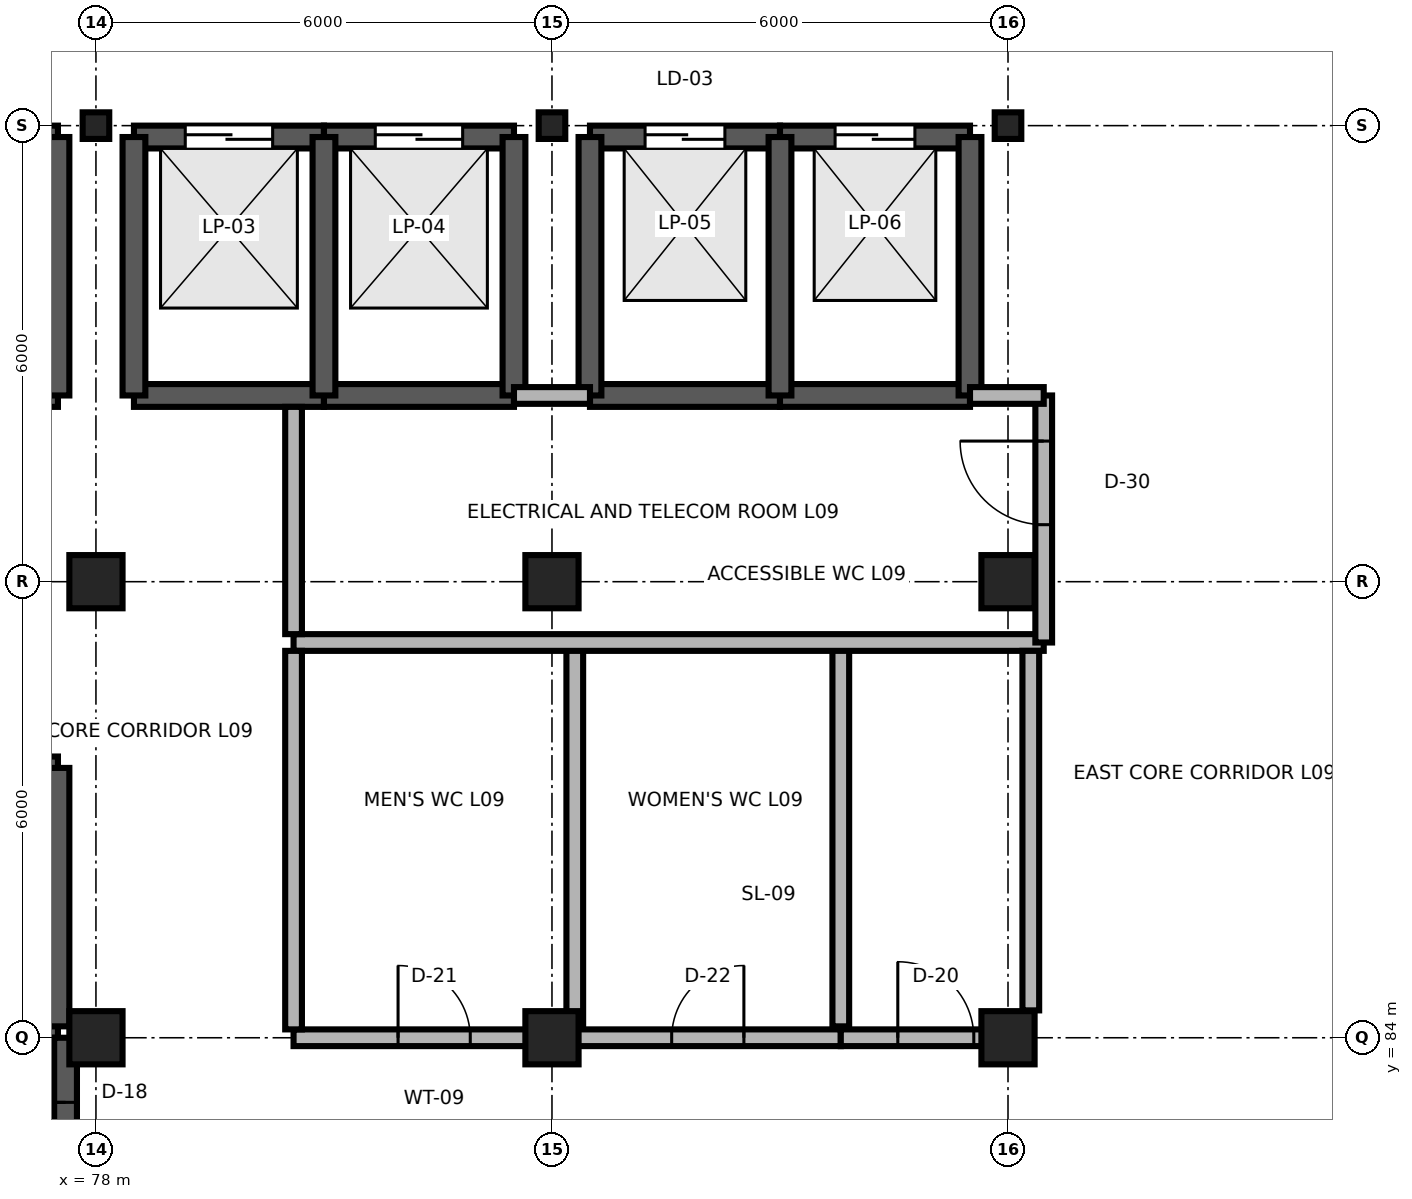
"""IFC4 building model, lengths in metres.
Left out: names, types, materials, properties, quantities, classifications, styles, units other than length and angle.
Written with IfcOpenShell. Run it as: python <this file> out.ifc"""

import sys

from ifc_helpers import new_model, si_unit, direction, frame, frame_2d, origin, origin_2d, place, context, subcontext, project, spatial, rectangle, i_section, extrude, element, fill, save


model = new_model("IFC4")
c1 = context("Model", 3, precision=1e-05, world=origin(), true_north=direction((0.0, 1.0)))
c2 = subcontext(c1, "Body", "Model", "MODEL_VIEW")
j1 = project(units=[si_unit("LENGTHUNIT", "METRE"), si_unit("PLANEANGLEUNIT", "RADIAN")], contexts=[c1])
p1 = place(None, origin())
s1 = spatial("IfcSite", under=j1, at=p1, CompositionType="ELEMENT")
p2 = place(p1, origin())
s2 = spatial("IfcBuilding", under=s1, at=p2, CompositionType="ELEMENT")
p3 = place(p2, frame((0.0, 0.0, 36.6)))
s3 = spatial("IfcBuildingStorey", under=s2, at=p3, CompositionType="ELEMENT", Elevation=36.6)
for number, where, z_axis, x_axis in (
    (1, (78.0, 84.0, 0.0), (0.0, 0.0, 1.0), (1.0, 0.0, 0.0)),
    (2, (84.0, 84.0, 0.0), (0.0, 0.0, 1.0), (1.0, 0.0, 0.0)),
    (3, (90.0, 84.0, 0.0), (0.0, 0.0, 1.0), (1.0, 0.0, 0.0)),
    (4, (78.0, 90.0, 0.0), (0.0, 0.0, 1.0), (1.0, 0.0, 0.0)),
    (5, (84.0, 90.0, 0.0), (0.0, 0.0, 1.0), (1.0, 0.0, 0.0)),
    (6, (90.0, 90.0, 0.0), (0.0, 0.0, 1.0), (1.0, 0.0, 0.0)),
):
    element("IfcColumn", number, at=place(p3, frame(where, z_axis=z_axis, x_axis=x_axis)), inside=s3, PredefinedType="COLUMN", context=c2, shape_type="SweptSolid", body=[
        extrude(rectangle(XDim=0.7, YDim=0.7, at=origin_2d()), origin(), (0.0, 0.0, 1.0), 3.9),
    ])
for number, where, z_axis, x_axis in (
    (7, (78.0, 96.0, 0.0), (0.0, 0.0, 1.0), (1.0, 0.0, 0.0)),
    (8, (84.0, 96.0, 0.0), (0.0, 0.0, 1.0), (1.0, 0.0, 0.0)),
    (9, (90.0, 96.0, 0.0), (0.0, 0.0, 1.0), (1.0, 0.0, 0.0)),
):
    element("IfcColumn", number, at=place(p3, frame(where, z_axis=z_axis, x_axis=x_axis)), inside=s3, PredefinedType="COLUMN", context=c2, shape_type="SweptSolid", body=[
        extrude(i_section(OverallWidth=0.35, OverallDepth=0.35, WebThickness=0.012, FlangeThickness=0.019, FilletRadius=0.02, at=origin_2d()), origin(), (0.0, 0.0, 1.0), 3.9),
    ])
p4 = place(p3, frame((75.0, 84.15, 0.0), z_axis=(0.0, 0.0, 1.0), x_axis=(1.0, 0.0, 0.0)))
e10 = element("IfcWall", 10, at=p4, inside=s3, PredefinedType="SHEAR", context=c2, shape_type="SweptSolid", body=[
    extrude(rectangle(XDim=2.5, YDim=0.3, at=frame_2d((1.25, 0.0))), origin(), (0.0, 0.0, 1.0), 3.74),
])
p5 = place(p4, frame((0.7, 0.0, 0.0)))
e11 = element("IfcOpeningElement", 11, at=p5, cuts=e10, PredefinedType="OPENING", context=c2, shape_type="SweptSolid", body=[
    extrude(rectangle(XDim=1.1, YDim=2.1, at=frame_2d((0.55, 1.05))), frame((0.0, 0.165, 0.0), z_axis=(0.0, -1.0, 0.0), x_axis=(1.0, 0.0, 0.0)), (0.0, 0.0, 1.0), 0.33),
])
p6 = place(p3, frame((75.0, 87.55, 0.0), z_axis=(0.0, 0.0, 1.0), x_axis=(1.0, 0.0, 0.0)))
e12 = element("IfcWall", 12, at=p6, inside=s3, PredefinedType="SHEAR", context=c2, shape_type="SweptSolid", body=[
    extrude(rectangle(XDim=2.5, YDim=0.3, at=frame_2d((1.25, 0.0))), origin(), (0.0, 0.0, 1.0), 3.74),
])
p7 = place(p3, frame((77.5, 84.15, 0.0), z_axis=(0.0, 0.0, 1.0), x_axis=(0.0, 1.0, 0.0)))
e13 = element("IfcWall", 13, at=p7, inside=s3, PredefinedType="SHEAR", context=c2, shape_type="SweptSolid", body=[
    extrude(rectangle(XDim=3.4, YDim=0.3, at=frame_2d((1.7, 0.0))), origin(), (0.0, 0.0, 1.0), 3.74),
])
p8 = place(p3, frame((75.0, 95.85, 0.0), z_axis=(0.0, 0.0, 1.0), x_axis=(1.0, 0.0, 0.0)))
e14 = element("IfcWall", 14, at=p8, inside=s3, PredefinedType="SHEAR", context=c2, shape_type="SweptSolid", body=[
    extrude(rectangle(XDim=2.5, YDim=0.3, at=frame_2d((1.25, 0.0))), origin(), (0.0, 0.0, 1.0), 3.74),
])
p9 = place(p8, frame((0.675, 0.0, 0.0)))
e15 = element("IfcOpeningElement", 15, at=p9, cuts=e14, PredefinedType="OPENING", context=c2, shape_type="SweptSolid", body=[
    extrude(rectangle(XDim=1.15, YDim=2.15, at=frame_2d((0.575, 1.075))), frame((0.0, 0.165, 0.0), z_axis=(0.0, -1.0, 0.0), x_axis=(1.0, 0.0, 0.0)), (0.0, 0.0, 1.0), 0.33),
])
p10 = place(p3, frame((75.0, 92.45, 0.0), z_axis=(0.0, 0.0, 1.0), x_axis=(1.0, 0.0, 0.0)))
e16 = element("IfcWall", 16, at=p10, inside=s3, PredefinedType="SHEAR", context=c2, shape_type="SweptSolid", body=[
    extrude(rectangle(XDim=2.5, YDim=0.3, at=frame_2d((1.25, 0.0))), origin(), (0.0, 0.0, 1.0), 3.74),
])
p11 = place(p3, frame((77.5, 92.45, 0.0), z_axis=(0.0, 0.0, 1.0), x_axis=(0.0, 1.0, 0.0)))
e17 = element("IfcWall", 17, at=p11, inside=s3, PredefinedType="SHEAR", context=c2, shape_type="SweptSolid", body=[
    extrude(rectangle(XDim=3.4, YDim=0.3, at=frame_2d((1.7, 0.0))), origin(), (0.0, 0.0, 1.0), 3.74),
])
p12 = place(p3, frame((78.5, 95.85, 0.0), z_axis=(0.0, 0.0, 1.0), x_axis=(1.0, 0.0, 0.0)))
e18 = element("IfcWall", 18, at=p12, inside=s3, PredefinedType="SHEAR", context=c2, shape_type="SweptSolid", body=[
    extrude(rectangle(XDim=2.5, YDim=0.3, at=frame_2d((1.25, 0.0))), origin(), (0.0, 0.0, 1.0), 3.74),
])
p13 = place(p12, frame((0.675, 0.0, 0.0)))
e19 = element("IfcOpeningElement", 19, at=p13, cuts=e18, PredefinedType="OPENING", context=c2, shape_type="SweptSolid", body=[
    extrude(rectangle(XDim=1.15, YDim=2.15, at=frame_2d((0.575, 1.075))), frame((0.0, 0.165, 0.0), z_axis=(0.0, -1.0, 0.0), x_axis=(1.0, 0.0, 0.0)), (0.0, 0.0, 1.0), 0.33),
])
p14 = place(p3, frame((78.5, 92.45, 0.0), z_axis=(0.0, 0.0, 1.0), x_axis=(1.0, 0.0, 0.0)))
e20 = element("IfcWall", 20, at=p14, inside=s3, PredefinedType="SHEAR", context=c2, shape_type="SweptSolid", body=[
    extrude(rectangle(XDim=2.5, YDim=0.3, at=frame_2d((1.25, 0.0))), origin(), (0.0, 0.0, 1.0), 3.74),
])
p15 = place(p3, frame((78.5, 92.45, 0.0), z_axis=(0.0, 0.0, 1.0), x_axis=(0.0, 1.0, 0.0)))
e21 = element("IfcWall", 21, at=p15, inside=s3, PredefinedType="SHEAR", context=c2, shape_type="SweptSolid", body=[
    extrude(rectangle(XDim=3.4, YDim=0.3, at=frame_2d((1.7, 0.0))), origin(), (0.0, 0.0, 1.0), 3.74),
])
p16 = place(p3, frame((81.0, 95.85, 0.0), z_axis=(0.0, 0.0, 1.0), x_axis=(1.0, 0.0, 0.0)))
e22 = element("IfcWall", 22, at=p16, inside=s3, PredefinedType="SHEAR", context=c2, shape_type="SweptSolid", body=[
    extrude(rectangle(XDim=2.5, YDim=0.3, at=frame_2d((1.25, 0.0))), origin(), (0.0, 0.0, 1.0), 3.74),
])
p17 = place(p16, frame((0.675, 0.0, 0.0)))
e23 = element("IfcOpeningElement", 23, at=p17, cuts=e22, PredefinedType="OPENING", context=c2, shape_type="SweptSolid", body=[
    extrude(rectangle(XDim=1.15, YDim=2.15, at=frame_2d((0.575, 1.075))), frame((0.0, 0.165, 0.0), z_axis=(0.0, -1.0, 0.0), x_axis=(1.0, 0.0, 0.0)), (0.0, 0.0, 1.0), 0.33),
])
p18 = place(p3, frame((81.0, 92.45, 0.0), z_axis=(0.0, 0.0, 1.0), x_axis=(1.0, 0.0, 0.0)))
e24 = element("IfcWall", 24, at=p18, inside=s3, PredefinedType="SHEAR", context=c2, shape_type="SweptSolid", body=[
    extrude(rectangle(XDim=2.5, YDim=0.3, at=frame_2d((1.25, 0.0))), origin(), (0.0, 0.0, 1.0), 3.74),
])
for number, where, z_axis, x_axis in (
    (25, (81.0, 92.45, 0.0), (0.0, 0.0, 1.0), (0.0, 1.0, 0.0)),
    (26, (83.5, 92.45, 0.0), (0.0, 0.0, 1.0), (0.0, 1.0, 0.0)),
):
    element("IfcWall", number, at=place(p3, frame(where, z_axis=z_axis, x_axis=x_axis)), inside=s3, PredefinedType="SHEAR", context=c2, shape_type="SweptSolid", body=[
        extrude(rectangle(XDim=3.4, YDim=0.3, at=frame_2d((1.7, 0.0))), origin(), (0.0, 0.0, 1.0), 3.74),
    ])
p19 = place(p3, frame((84.5, 95.85, 0.0), z_axis=(0.0, 0.0, 1.0), x_axis=(1.0, 0.0, 0.0)))
e27 = element("IfcWall", 27, at=p19, inside=s3, PredefinedType="SHEAR", context=c2, shape_type="SweptSolid", body=[
    extrude(rectangle(XDim=2.5, YDim=0.3, at=frame_2d((1.25, 0.0))), origin(), (0.0, 0.0, 1.0), 3.74),
])
p20 = place(p19, frame((0.725, 0.0, 0.0)))
e28 = element("IfcOpeningElement", 28, at=p20, cuts=e27, PredefinedType="OPENING", context=c2, shape_type="SweptSolid", body=[
    extrude(rectangle(XDim=1.05, YDim=2.1, at=frame_2d((0.525, 1.05))), frame((0.0, 0.165, 0.0), z_axis=(0.0, -1.0, 0.0), x_axis=(1.0, 0.0, 0.0)), (0.0, 0.0, 1.0), 0.33),
])
p21 = place(p3, frame((84.5, 92.45, 0.0), z_axis=(0.0, 0.0, 1.0), x_axis=(1.0, 0.0, 0.0)))
e29 = element("IfcWall", 29, at=p21, inside=s3, PredefinedType="SHEAR", context=c2, shape_type="SweptSolid", body=[
    extrude(rectangle(XDim=2.5, YDim=0.3, at=frame_2d((1.25, 0.0))), origin(), (0.0, 0.0, 1.0), 3.74),
])
p22 = place(p3, frame((84.5, 92.45, 0.0), z_axis=(0.0, 0.0, 1.0), x_axis=(0.0, 1.0, 0.0)))
e30 = element("IfcWall", 30, at=p22, inside=s3, PredefinedType="SHEAR", context=c2, shape_type="SweptSolid", body=[
    extrude(rectangle(XDim=3.4, YDim=0.3, at=frame_2d((1.7, 0.0))), origin(), (0.0, 0.0, 1.0), 3.74),
])
p23 = place(p3, frame((87.0, 95.85, 0.0), z_axis=(0.0, 0.0, 1.0), x_axis=(1.0, 0.0, 0.0)))
e31 = element("IfcWall", 31, at=p23, inside=s3, PredefinedType="SHEAR", context=c2, shape_type="SweptSolid", body=[
    extrude(rectangle(XDim=2.5, YDim=0.3, at=frame_2d((1.25, 0.0))), origin(), (0.0, 0.0, 1.0), 3.74),
])
p24 = place(p23, frame((0.725, 0.0, 0.0)))
e32 = element("IfcOpeningElement", 32, at=p24, cuts=e31, PredefinedType="OPENING", context=c2, shape_type="SweptSolid", body=[
    extrude(rectangle(XDim=1.05, YDim=2.1, at=frame_2d((0.525, 1.05))), frame((0.0, 0.165, 0.0), z_axis=(0.0, -1.0, 0.0), x_axis=(1.0, 0.0, 0.0)), (0.0, 0.0, 1.0), 0.33),
])
p25 = place(p3, frame((87.0, 92.45, 0.0), z_axis=(0.0, 0.0, 1.0), x_axis=(1.0, 0.0, 0.0)))
e33 = element("IfcWall", 33, at=p25, inside=s3, PredefinedType="SHEAR", context=c2, shape_type="SweptSolid", body=[
    extrude(rectangle(XDim=2.5, YDim=0.3, at=frame_2d((1.25, 0.0))), origin(), (0.0, 0.0, 1.0), 3.74),
])
for number, where, z_axis, x_axis in (
    (34, (87.0, 92.45, 0.0), (0.0, 0.0, 1.0), (0.0, 1.0, 0.0)),
    (35, (89.5, 92.45, 0.0), (0.0, 0.0, 1.0), (0.0, 1.0, 0.0)),
):
    element("IfcWall", number, at=place(p3, frame(where, z_axis=z_axis, x_axis=x_axis)), inside=s3, PredefinedType="SHEAR", context=c2, shape_type="SweptSolid", body=[
        extrude(rectangle(XDim=3.4, YDim=0.3, at=frame_2d((1.7, 0.0))), origin(), (0.0, 0.0, 1.0), 3.74),
    ])
p26 = place(p3, frame((77.6, 81.0, 0.0), z_axis=(0.0, 0.0, 1.0), x_axis=(0.0, 1.0, 0.0)))
e36 = element("IfcWall", 36, at=p26, inside=s3, PredefinedType="SHEAR", context=c2, shape_type="SweptSolid", body=[
    extrude(rectangle(XDim=3.0, YDim=0.3, at=frame_2d((1.5, 0.0))), origin(), (0.0, 0.0, 1.0), 3.74),
])
p27 = place(p26, frame((0.85, 0.0, 0.0)))
e37 = element("IfcOpeningElement", 37, at=p27, cuts=e36, PredefinedType="OPENING", context=c2, shape_type="SweptSolid", body=[
    extrude(rectangle(XDim=1.3, YDim=2.2, at=frame_2d((0.65, 1.1))), frame((0.0, 0.165, 0.0), z_axis=(0.0, -1.0, 0.0), x_axis=(1.0, 0.0, 0.0)), (0.0, 0.0, 1.0), 0.33),
])
p28 = place(p3, frame((80.6, 84.0, 0.0), z_axis=(0.0, 0.0, 1.0), x_axis=(1.0, 0.0, 0.0)))
e38 = element("IfcWall", 38, at=p28, inside=s3, PredefinedType="PARTITIONING", context=c2, shape_type="SweptSolid", body=[
    extrude(rectangle(XDim=3.7, YDim=0.22, at=frame_2d((1.85, 0.0))), origin(), (0.0, 0.0, 1.0), 3.348),
])
p29 = place(p28, frame((1.375, 0.0, 0.0)))
e39 = element("IfcOpeningElement", 39, at=p29, cuts=e38, PredefinedType="OPENING", context=c2, shape_type="SweptSolid", body=[
    extrude(rectangle(XDim=0.95, YDim=2.15, at=frame_2d((0.475, 1.075))), frame((0.0, 0.125, 0.0), z_axis=(0.0, -1.0, 0.0), x_axis=(1.0, 0.0, 0.0)), (0.0, 0.0, 1.0), 0.25),
])
p30 = place(p3, frame((84.3, 84.0, 0.0), z_axis=(0.0, 0.0, 1.0), x_axis=(1.0, 0.0, 0.0)))
e40 = element("IfcWall", 40, at=p30, inside=s3, PredefinedType="PARTITIONING", context=c2, shape_type="SweptSolid", body=[
    extrude(rectangle(XDim=3.5, YDim=0.22, at=frame_2d((1.75, 0.0))), origin(), (0.0, 0.0, 1.0), 3.348),
])
p31 = place(p30, frame((1.275, 0.0, 0.0)))
e41 = element("IfcOpeningElement", 41, at=p31, cuts=e40, PredefinedType="OPENING", context=c2, shape_type="SweptSolid", body=[
    extrude(rectangle(XDim=0.95, YDim=2.1, at=frame_2d((0.475, 1.05))), frame((0.0, 0.125, 0.0), z_axis=(0.0, -1.0, 0.0), x_axis=(1.0, 0.0, 0.0)), (0.0, 0.0, 1.0), 0.25),
])
p32 = place(p3, frame((87.8, 84.0, 0.0), z_axis=(0.0, 0.0, 1.0), x_axis=(1.0, 0.0, 0.0)))
e42 = element("IfcWall", 42, at=p32, inside=s3, PredefinedType="PARTITIONING", context=c2, shape_type="SweptSolid", body=[
    extrude(rectangle(XDim=2.5, YDim=0.22, at=frame_2d((1.25, 0.0))), origin(), (0.0, 0.0, 1.0), 3.348),
])
p33 = place(p32, frame((0.75, 0.0, 0.0)))
e43 = element("IfcOpeningElement", 43, at=p33, cuts=e42, PredefinedType="OPENING", context=c2, shape_type="SweptSolid", body=[
    extrude(rectangle(XDim=1.0, YDim=2.15, at=frame_2d((0.5, 1.075))), frame((0.0, 0.125, 0.0), z_axis=(0.0, -1.0, 0.0), x_axis=(1.0, 0.0, 0.0)), (0.0, 0.0, 1.0), 0.25),
])
for number, where, z_axis, x_axis in (
    (44, (84.3, 84.15, 0.0), (0.0, 0.0, 1.0), (0.0, 1.0, 0.0)),
    (45, (87.8, 84.15, 0.0), (0.0, 0.0, 1.0), (0.0, 1.0, 0.0)),
):
    element("IfcWall", number, at=place(p3, frame(where, z_axis=z_axis, x_axis=x_axis)), inside=s3, PredefinedType="PARTITIONING", context=c2, shape_type="SweptSolid", body=[
        extrude(rectangle(XDim=5.0, YDim=0.22, at=frame_2d((2.5, 0.0))), origin(), (0.0, 0.0, 1.0), 3.74),
    ])
p34 = place(p3, frame((80.6, 89.2, 0.0), z_axis=(0.0, 0.0, 1.0), x_axis=(1.0, 0.0, 0.0)))
e46 = element("IfcWall", 46, at=p34, inside=s3, PredefinedType="PARTITIONING", context=c2, shape_type="SweptSolid", body=[
    extrude(rectangle(XDim=9.87, YDim=0.22, at=frame_2d((4.935, 0.0))), origin(), (0.0, 0.0, 1.0), 3.74),
])
p35 = place(p3, frame((90.47, 89.2, 0.0), z_axis=(0.0, 0.0, 1.0), x_axis=(0.0, 1.0, 0.0)))
e47 = element("IfcWall", 47, at=p35, inside=s3, PredefinedType="PARTITIONING", context=c2, shape_type="SweptSolid", body=[
    extrude(rectangle(XDim=3.25, YDim=0.22, at=frame_2d((1.625, 0.0))), origin(), (0.0, 0.0, 1.0), 3.74),
])
p36 = place(p35, frame((1.55, 0.0, 0.0)))
e48 = element("IfcOpeningElement", 48, at=p36, cuts=e47, PredefinedType="OPENING", context=c2, shape_type="SweptSolid", body=[
    extrude(rectangle(XDim=1.1, YDim=2.15, at=frame_2d((0.55, 1.075))), frame((0.0, 0.125, 0.0), z_axis=(0.0, -1.0, 0.0), x_axis=(1.0, 0.0, 0.0)), (0.0, 0.0, 1.0), 0.25),
])
p37 = place(p3, frame((80.6, 84.11, 0.0), z_axis=(0.0, 0.0, 1.0), x_axis=(0.0, 1.0, 0.0)))
e49 = element("IfcWall", 49, at=p37, inside=s3, PredefinedType="PARTITIONING", context=c2, shape_type="SweptSolid", body=[
    extrude(rectangle(XDim=4.98, YDim=0.22, at=frame_2d((2.49, 0.0))), origin(), (0.0, 0.0, 1.0), 3.74),
])
p38 = place(p3, frame((90.3, 84.36, 0.0), z_axis=(0.0, 0.0, 1.0), x_axis=(0.0, 1.0, 0.0)))
e50 = element("IfcWall", 50, at=p38, inside=s3, PredefinedType="PARTITIONING", context=c2, shape_type="SweptSolid", body=[
    extrude(rectangle(XDim=4.73, YDim=0.22, at=frame_2d((2.365, 0.0))), origin(), (0.0, 0.0, 1.0), 3.74),
])
p39 = place(p3, frame((80.6, 89.31, 0.0), z_axis=(0.0, 0.0, 1.0), x_axis=(0.0, 1.0, 0.0)))
e51 = element("IfcWall", 51, at=p39, inside=s3, PredefinedType="PARTITIONING", context=c2, shape_type="SweptSolid", body=[
    extrude(rectangle(XDim=2.99, YDim=0.22, at=frame_2d((1.495, 0.0))), origin(), (0.0, 0.0, 1.0), 3.74),
])
p40 = place(p3, frame((83.5, 92.45, 0.0), z_axis=(0.0, 0.0, 1.0), x_axis=(1.0, 0.0, 0.0)))
e52 = element("IfcWall", 52, at=p40, inside=s3, PredefinedType="PARTITIONING", context=c2, shape_type="SweptSolid", body=[
    extrude(rectangle(XDim=1.0, YDim=0.22, at=frame_2d((0.5, 0.0))), origin(), (0.0, 0.0, 1.0), 3.74),
])
p41 = place(p3, frame((89.5, 92.45, 0.0), z_axis=(0.0, 0.0, 1.0), x_axis=(1.0, 0.0, 0.0)))
e53 = element("IfcWall", 53, at=p41, inside=s3, PredefinedType="PARTITIONING", context=c2, shape_type="SweptSolid", body=[
    extrude(rectangle(XDim=0.97, YDim=0.22, at=frame_2d((0.485, 0.0))), origin(), (0.0, 0.0, 1.0), 3.74),
])
p42 = place(p13, origin())
e54 = element("IfcDoor", 54, at=p42, inside=s3, OperationType="DOUBLE_DOOR_SLIDING", PredefinedType="DOOR", context=c2, shape_type="SweptSolid", body=[
    extrude(rectangle(XDim=1.15, YDim=2.15, at=frame_2d((0.575, 1.075))), frame((0.0, 0.025, 0.0), z_axis=(0.0, -1.0, 0.0), x_axis=(1.0, 0.0, 0.0)), (0.0, 0.0, 1.0), 0.05),
])
fill(e19, e54)
p43 = place(p17, origin())
e55 = element("IfcDoor", 55, at=p43, inside=s3, OperationType="DOUBLE_DOOR_SLIDING", PredefinedType="DOOR", context=c2, shape_type="SweptSolid", body=[
    extrude(rectangle(XDim=1.15, YDim=2.15, at=frame_2d((0.575, 1.075))), frame((0.0, 0.025, 0.0), z_axis=(0.0, -1.0, 0.0), x_axis=(1.0, 0.0, 0.0)), (0.0, 0.0, 1.0), 0.05),
])
fill(e23, e55)
p44 = place(p20, origin())
e56 = element("IfcDoor", 56, at=p44, inside=s3, OperationType="DOUBLE_DOOR_SLIDING", PredefinedType="DOOR", context=c2, shape_type="SweptSolid", body=[
    extrude(rectangle(XDim=1.05, YDim=2.1, at=frame_2d((0.525, 1.05))), frame((0.0, 0.025, 0.0), z_axis=(0.0, -1.0, 0.0), x_axis=(1.0, 0.0, 0.0)), (0.0, 0.0, 1.0), 0.05),
])
fill(e28, e56)
p45 = place(p24, origin())
e57 = element("IfcDoor", 57, at=p45, inside=s3, OperationType="DOUBLE_DOOR_SLIDING", PredefinedType="DOOR", context=c2, shape_type="SweptSolid", body=[
    extrude(rectangle(XDim=1.05, YDim=2.1, at=frame_2d((0.525, 1.05))), frame((0.0, 0.025, 0.0), z_axis=(0.0, -1.0, 0.0), x_axis=(1.0, 0.0, 0.0)), (0.0, 0.0, 1.0), 0.05),
])
fill(e32, e57)
p46 = place(p27, origin())
e58 = element("IfcDoor", 58, at=p46, inside=s3, OperationType="SINGLE_SWING_RIGHT", PredefinedType="DOOR", context=c2, shape_type="SweptSolid", body=[
    extrude(rectangle(XDim=1.3, YDim=2.2, at=frame_2d((0.65, 1.1))), frame((0.0, 0.025, 0.0), z_axis=(0.0, -1.0, 0.0), x_axis=(1.0, 0.0, 0.0)), (0.0, 0.0, 1.0), 0.05),
])
fill(e37, e58)
p47 = place(p29, origin())
e59 = element("IfcDoor", 59, at=p47, inside=s3, OperationType="SINGLE_SWING_LEFT", PredefinedType="DOOR", context=c2, shape_type="SweptSolid", body=[
    extrude(rectangle(XDim=0.95, YDim=2.15, at=frame_2d((0.475, 1.075))), frame((0.0, 0.025, 0.0), z_axis=(0.0, -1.0, 0.0), x_axis=(1.0, 0.0, 0.0)), (0.0, 0.0, 1.0), 0.05),
])
fill(e39, e59)
p48 = place(p31, origin())
e60 = element("IfcDoor", 60, at=p48, inside=s3, OperationType="SINGLE_SWING_RIGHT", PredefinedType="DOOR", context=c2, shape_type="SweptSolid", body=[
    extrude(rectangle(XDim=0.95, YDim=2.1, at=frame_2d((0.475, 1.05))), frame((0.0, 0.025, 0.0), z_axis=(0.0, -1.0, 0.0), x_axis=(1.0, 0.0, 0.0)), (0.0, 0.0, 1.0), 0.05),
])
fill(e41, e60)
p49 = place(p33, origin())
e61 = element("IfcDoor", 61, at=p49, inside=s3, OperationType="SINGLE_SWING_LEFT", PredefinedType="DOOR", context=c2, shape_type="SweptSolid", body=[
    extrude(rectangle(XDim=1.0, YDim=2.15, at=frame_2d((0.5, 1.075))), frame((0.0, 0.025, 0.0), z_axis=(0.0, -1.0, 0.0), x_axis=(1.0, 0.0, 0.0)), (0.0, 0.0, 1.0), 0.05),
])
fill(e43, e61)
p50 = place(p36, origin())
e62 = element("IfcDoor", 62, at=p50, inside=s3, OperationType="SINGLE_SWING_RIGHT", PredefinedType="DOOR", context=c2, shape_type="SweptSolid", body=[
    extrude(rectangle(XDim=1.1, YDim=2.15, at=frame_2d((0.55, 1.075))), frame((0.0, 0.025, 0.0), z_axis=(0.0, -1.0, 0.0), x_axis=(1.0, 0.0, 0.0)), (0.0, 0.0, 1.0), 0.05),
])
fill(e48, e62)
save(model, sys.argv[1])
